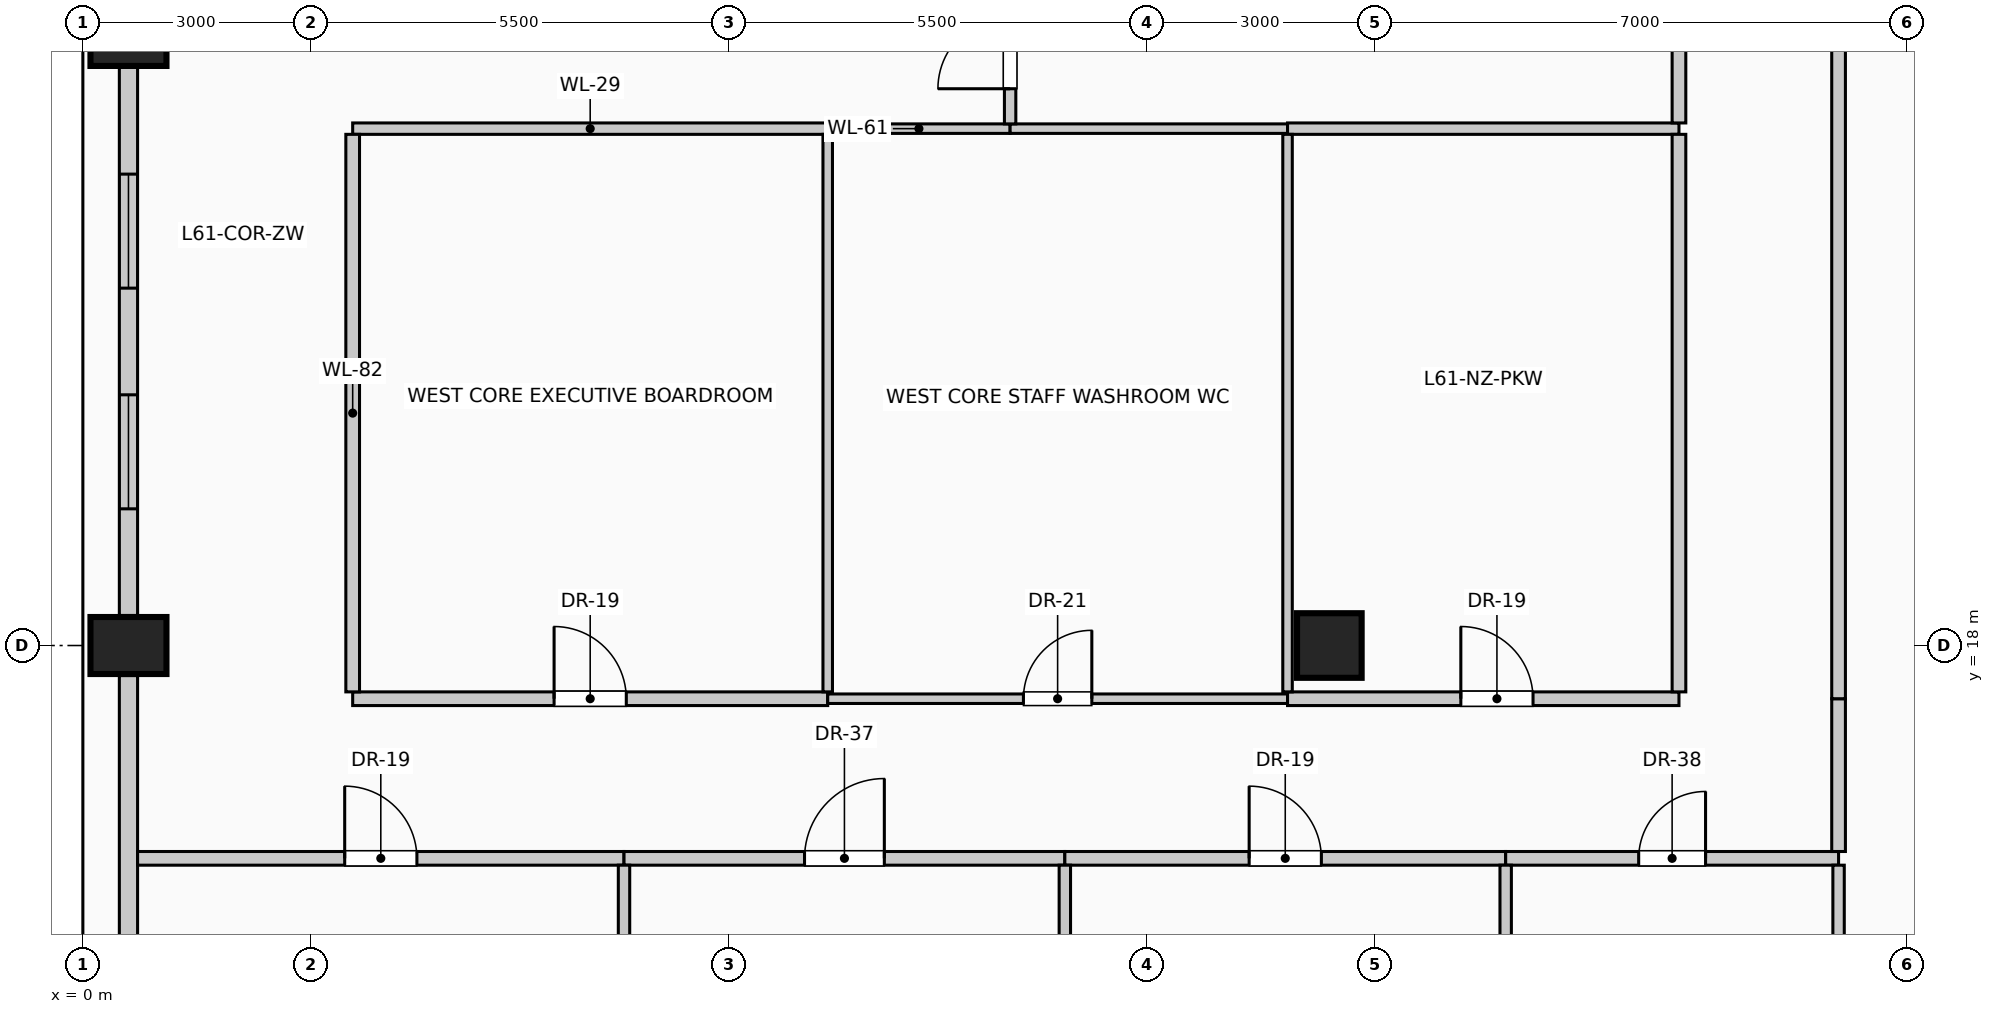
"""IFC4 building model, lengths in metres.
Left out: names, types, materials, properties, quantities, classifications, styles, units other than length and angle.
Written with IfcOpenShell. Run it as: python <this file> out.ifc"""

import sys

from ifc_helpers import new_model, si_unit, direction, frame, frame_2d, origin, origin_2d, place, context, subcontext, project, spatial, rectangle, circle, extrude, element, fill, save


model = new_model("IFC4")
c1 = context("Model", 3, precision=1e-05, world=origin(), true_north=direction((0.0, 1.0)))
c2 = subcontext(c1, "Body", "Model", "MODEL_VIEW")
j1 = project(units=[si_unit("LENGTHUNIT", "METRE"), si_unit("PLANEANGLEUNIT", "RADIAN")], contexts=[c1])
p1 = place(None, origin())
s1 = spatial("IfcSite", under=j1, at=p1, CompositionType="ELEMENT")
p2 = place(p1, origin())
s2 = spatial("IfcBuilding", under=s1, at=p2, CompositionType="ELEMENT")
p3 = place(p2, frame((0.0, 0.0, 252.6)))
s3 = spatial("IfcBuildingStorey", under=s2, at=p3, CompositionType="ELEMENT", Elevation=252.6)
for number, where, z_axis, x_axis in (
    (1, (0.6, 18.0, 0.0), (0.0, 0.0, 1.0), (0.0, 1.0, 0.0)),
    (2, (0.6, 26.0, 0.0), (0.0, 0.0, 1.0), (0.0, 1.0, 0.0)),
):
    element("IfcColumn", number, at=place(p3, frame(where, z_axis=z_axis, x_axis=x_axis)), inside=s3, PredefinedType="COLUMN", context=c2, shape_type="SweptSolid", body=[
        extrude(rectangle(XDim=0.75, YDim=1.0, at=origin_2d()), origin(), (0.0, 0.0, 1.0), 4.0),
    ])
p4 = place(p3, frame((16.4, 18.0, 0.0), z_axis=(0.0, 0.0, 1.0), x_axis=(1.0, 0.0, 0.0)))
e3 = element("IfcColumn", 3, at=p4, inside=s3, PredefinedType="COLUMN", context=c2, shape_type="SweptSolid", body=[
    extrude(circle(Radius=0.425, at=origin_2d()), origin(), (0.0, 0.0, 1.0), 4.0),
])
p5 = place(p3, frame((0.6, 10.395, 0.0), z_axis=(0.0, 0.0, 1.0), x_axis=(0.0, 1.0, 0.0)))
e4 = element("IfcWall", 4, at=p5, inside=s3, PredefinedType="SOLIDWALL", context=c2, shape_type="SweptSolid", body=[
    extrude(rectangle(XDim=7.21, YDim=0.24, at=frame_2d((3.605, 0.0))), origin(), (0.0, 0.0, 1.0), 3.0),
])
p6 = place(p5, frame((1.403, 0.0, 0.42)))
e5 = element("IfcOpeningElement", 5, at=p6, cuts=e4, PredefinedType="OPENING", context=c2, shape_type="SweptSolid", body=[
    extrude(rectangle(XDim=1.5, YDim=2.2, at=frame_2d((0.75, 1.1))), frame((0.0, 0.13, 0.0), z_axis=(0.0, -1.0, 0.0), x_axis=(1.0, 0.0, 0.0)), (0.0, 0.0, 1.0), 0.26),
])
p7 = place(p3, frame((0.6, 18.395, 0.0), z_axis=(0.0, 0.0, 1.0), x_axis=(0.0, 1.0, 0.0)))
e6 = element("IfcWall", 6, at=p7, inside=s3, PredefinedType="SOLIDWALL", context=c2, shape_type="SweptSolid", body=[
    extrude(rectangle(XDim=7.21, YDim=0.24, at=frame_2d((3.605, 0.0))), origin(), (0.0, 0.0, 1.0), 3.0),
])
p8 = place(p7, frame((1.403, 0.0, 0.42)))
e7 = element("IfcOpeningElement", 7, at=p8, cuts=e6, PredefinedType="OPENING", context=c2, shape_type="SweptSolid", body=[
    extrude(rectangle(XDim=1.5, YDim=2.2, at=frame_2d((0.75, 1.1))), frame((0.0, 0.13, 0.0), z_axis=(0.0, -1.0, 0.0), x_axis=(1.0, 0.0, 0.0)), (0.0, 0.0, 1.0), 0.26),
])
p9 = place(p7, frame((4.307, 0.0, 0.42)))
e8 = element("IfcOpeningElement", 8, at=p9, cuts=e6, PredefinedType="OPENING", context=c2, shape_type="SweptSolid", body=[
    extrude(rectangle(XDim=1.5, YDim=2.2, at=frame_2d((0.75, 1.1))), frame((0.0, 0.13, 0.0), z_axis=(0.0, -1.0, 0.0), x_axis=(1.0, 0.0, 0.0)), (0.0, 0.0, 1.0), 0.26),
])
p10 = place(p3, frame((0.72, 15.2, 0.0), z_axis=(0.0, 0.0, 1.0), x_axis=(1.0, 0.0, 0.0)))
e9 = element("IfcWall", 9, at=p10, inside=s3, PredefinedType="PARTITIONING", context=c2, shape_type="SweptSolid", body=[
    extrude(rectangle(XDim=6.4, YDim=0.18, at=frame_2d((3.2, 0.0))), origin(), (0.0, 0.0, 1.0), 3.75),
])
p11 = place(p10, frame((2.725, 0.0, 0.0)))
e10 = element("IfcOpeningElement", 10, at=p11, cuts=e9, PredefinedType="OPENING", context=c2, shape_type="SweptSolid", body=[
    extrude(rectangle(XDim=0.95, YDim=2.15, at=frame_2d((0.475, 1.075))), frame((0.0, 0.1, 0.0), z_axis=(0.0, -1.0, 0.0), x_axis=(1.0, 0.0, 0.0)), (0.0, 0.0, 1.0), 0.2),
])
p12 = place(p3, frame((7.12, 15.2, 0.0), z_axis=(0.0, 0.0, 1.0), x_axis=(1.0, 0.0, 0.0)))
e11 = element("IfcWall", 11, at=p12, inside=s3, PredefinedType="PARTITIONING", context=c2, shape_type="SweptSolid", body=[
    extrude(rectangle(XDim=5.8, YDim=0.18, at=frame_2d((2.9, 0.0))), origin(), (0.0, 0.0, 1.0), 3.75),
])
p13 = place(p12, frame((2.375, 0.0, 0.0)))
e12 = element("IfcOpeningElement", 12, at=p13, cuts=e11, PredefinedType="OPENING", context=c2, shape_type="SweptSolid", body=[
    extrude(rectangle(XDim=1.05, YDim=2.15, at=frame_2d((0.525, 1.075))), frame((0.0, 0.1, 0.0), z_axis=(0.0, -1.0, 0.0), x_axis=(1.0, 0.0, 0.0)), (0.0, 0.0, 1.0), 0.2),
])
p14 = place(p3, frame((12.92, 15.2, 0.0), z_axis=(0.0, 0.0, 1.0), x_axis=(1.0, 0.0, 0.0)))
e13 = element("IfcWall", 13, at=p14, inside=s3, PredefinedType="PARTITIONING", context=c2, shape_type="SweptSolid", body=[
    extrude(rectangle(XDim=5.8, YDim=0.18, at=frame_2d((2.9, 0.0))), origin(), (0.0, 0.0, 1.0), 3.75),
])
p15 = place(p14, frame((2.425, 0.0, 0.0)))
e14 = element("IfcOpeningElement", 14, at=p15, cuts=e13, PredefinedType="OPENING", context=c2, shape_type="SweptSolid", body=[
    extrude(rectangle(XDim=0.95, YDim=2.15, at=frame_2d((0.475, 1.075))), frame((0.0, 0.1, 0.0), z_axis=(0.0, -1.0, 0.0), x_axis=(1.0, 0.0, 0.0)), (0.0, 0.0, 1.0), 0.2),
])
p16 = place(p3, frame((18.72, 15.2, 0.0), z_axis=(0.0, 0.0, 1.0), x_axis=(1.0, 0.0, 0.0)))
e15 = element("IfcWall", 15, at=p16, inside=s3, PredefinedType="PARTITIONING", context=c2, shape_type="SweptSolid", body=[
    extrude(rectangle(XDim=4.38, YDim=0.18, at=frame_2d((2.19, 0.0))), origin(), (0.0, 0.0, 1.0), 3.75),
])
p17 = place(p16, frame((1.75, 0.0, 0.0)))
e16 = element("IfcOpeningElement", 16, at=p17, cuts=e15, PredefinedType="OPENING", context=c2, shape_type="SweptSolid", body=[
    extrude(rectangle(XDim=0.88, YDim=2.1, at=frame_2d((0.44, 1.05))), frame((0.0, 0.1, 0.0), z_axis=(0.0, -1.0, 0.0), x_axis=(1.0, 0.0, 0.0)), (0.0, 0.0, 1.0), 0.2),
])
p18 = place(p3, frame((3.55, 17.3, 0.0), z_axis=(0.0, 0.0, 1.0), x_axis=(1.0, 0.0, 0.0)))
e17 = element("IfcWall", 17, at=p18, inside=s3, PredefinedType="PARTITIONING", context=c2, shape_type="SweptSolid", body=[
    extrude(rectangle(XDim=6.25, YDim=0.18, at=frame_2d((3.125, 0.0))), origin(), (0.0, 0.0, 1.0), 3.75),
])
p19 = place(p18, frame((2.65, 0.0, 0.0)))
e18 = element("IfcOpeningElement", 18, at=p19, cuts=e17, PredefinedType="OPENING", context=c2, shape_type="SweptSolid", body=[
    extrude(rectangle(XDim=0.95, YDim=2.15, at=frame_2d((0.475, 1.075))), frame((0.0, 0.1, 0.0), z_axis=(0.0, -1.0, 0.0), x_axis=(1.0, 0.0, 0.0)), (0.0, 0.0, 1.0), 0.2),
])
p20 = place(p3, frame((9.8, 17.3, 0.0), z_axis=(0.0, 0.0, 1.0), x_axis=(1.0, 0.0, 0.0)))
e19 = element("IfcWall", 19, at=p20, inside=s3, PredefinedType="PARTITIONING", context=c2, shape_type="SweptSolid", body=[
    extrude(rectangle(XDim=6.05, YDim=0.125, at=frame_2d((3.025, 0.0))), origin(), (0.0, 0.0, 1.0), 3.75),
])
p21 = place(p20, frame((2.575, 0.0, 0.0)))
e20 = element("IfcOpeningElement", 20, at=p21, cuts=e19, PredefinedType="OPENING", context=c2, shape_type="SweptSolid", body=[
    extrude(rectangle(XDim=0.9, YDim=2.1, at=frame_2d((0.45, 1.05))), frame((0.0, 0.073, 0.0), z_axis=(0.0, -1.0, 0.0), x_axis=(1.0, 0.0, 0.0)), (0.0, 0.0, 1.0), 0.145),
])
p22 = place(p3, frame((15.85, 17.3, 0.0), z_axis=(0.0, 0.0, 1.0), x_axis=(1.0, 0.0, 0.0)))
e21 = element("IfcWall", 21, at=p22, inside=s3, PredefinedType="PARTITIONING", context=c2, shape_type="SweptSolid", body=[
    extrude(rectangle(XDim=5.15, YDim=0.18, at=frame_2d((2.575, 0.0))), origin(), (0.0, 0.0, 1.0), 3.75),
])
p23 = place(p22, frame((2.28, 0.0, 0.0)))
e22 = element("IfcOpeningElement", 22, at=p23, cuts=e21, PredefinedType="OPENING", context=c2, shape_type="SweptSolid", body=[
    extrude(rectangle(XDim=0.95, YDim=2.15, at=frame_2d((0.475, 1.075))), frame((0.0, 0.1, 0.0), z_axis=(0.0, -1.0, 0.0), x_axis=(1.0, 0.0, 0.0)), (0.0, 0.0, 1.0), 0.2),
])
p24 = place(p3, frame((3.55, 24.8, 0.0), z_axis=(0.0, 0.0, 1.0), x_axis=(1.0, 0.0, 0.0)))
e23 = element("IfcWall", 23, at=p24, inside=s3, PredefinedType="PARTITIONING", context=c2, shape_type="SweptSolid", body=[
    extrude(rectangle(XDim=6.25, YDim=0.15, at=frame_2d((3.125, 0.0))), origin(), (0.0, 0.0, 1.0), 3.75),
])
p25 = place(p3, frame((9.8, 24.8, 0.0), z_axis=(0.0, 0.0, 1.0), x_axis=(1.0, 0.0, 0.0)))
e24 = element("IfcWall", 24, at=p25, inside=s3, PredefinedType="PARTITIONING", context=c2, shape_type="SweptSolid", body=[
    extrude(rectangle(XDim=2.4, YDim=0.125, at=frame_2d((1.2, 0.0))), origin(), (0.0, 0.0, 1.0), 3.75),
])
p26 = place(p3, frame((12.2, 24.8, 0.0), z_axis=(0.0, 0.0, 1.0), x_axis=(1.0, 0.0, 0.0)))
e25 = element("IfcWall", 25, at=p26, inside=s3, PredefinedType="PARTITIONING", context=c2, shape_type="SweptSolid", body=[
    extrude(rectangle(XDim=3.65, YDim=0.125, at=frame_2d((1.825, 0.0))), origin(), (0.0, 0.0, 1.0), 3.75),
])
p27 = place(p3, frame((15.85, 24.8, 0.0), z_axis=(0.0, 0.0, 1.0), x_axis=(1.0, 0.0, 0.0)))
e26 = element("IfcWall", 26, at=p27, inside=s3, PredefinedType="PARTITIONING", context=c2, shape_type="SweptSolid", body=[
    extrude(rectangle(XDim=5.15, YDim=0.15, at=frame_2d((2.575, 0.0))), origin(), (0.0, 0.0, 1.0), 3.75),
])
p28 = place(p3, frame((3.55, 17.39, 0.0), z_axis=(0.0, 0.0, 1.0), x_axis=(0.0, 1.0, 0.0)))
e27 = element("IfcWall", 27, at=p28, inside=s3, PredefinedType="PARTITIONING", context=c2, shape_type="SweptSolid", body=[
    extrude(rectangle(XDim=7.335, YDim=0.18, at=frame_2d((3.667, 0.0))), origin(), (0.0, 0.0, 1.0), 3.75),
])
p29 = place(p3, frame((7.12, 0.72, 0.0), z_axis=(0.0, 0.0, 1.0), x_axis=(0.0, 1.0, 0.0)))
e28 = element("IfcWall", 28, at=p29, inside=s3, PredefinedType="PARTITIONING", context=c2, shape_type="SweptSolid", body=[
    extrude(rectangle(XDim=14.39, YDim=0.15, at=frame_2d((7.195, 0.0))), origin(), (0.0, 0.0, 1.0), 3.75),
])
p30 = place(p3, frame((9.8, 17.39, 0.0), z_axis=(0.0, 0.0, 1.0), x_axis=(0.0, 1.0, 0.0)))
e29 = element("IfcWall", 29, at=p30, inside=s3, PredefinedType="PARTITIONING", context=c2, shape_type="SweptSolid", body=[
    extrude(rectangle(XDim=7.335, YDim=0.125, at=frame_2d((3.667, 0.0))), origin(), (0.0, 0.0, 1.0), 3.75),
])
p31 = place(p3, frame((12.2, 24.863, 0.0), z_axis=(0.0, 0.0, 1.0), x_axis=(0.0, 1.0, 0.0)))
e30 = element("IfcWall", 30, at=p31, inside=s3, PredefinedType="PARTITIONING", context=c2, shape_type="SweptSolid", body=[
    extrude(rectangle(XDim=1.875, YDim=0.15, at=frame_2d((0.938, 0.0))), origin(), (0.0, 0.0, 1.0), 3.75),
])
p32 = place(p31, frame((0.462, 0.0, 0.0)))
e31 = element("IfcOpeningElement", 31, at=p32, cuts=e30, PredefinedType="OPENING", context=c2, shape_type="SweptSolid", body=[
    extrude(rectangle(XDim=0.95, YDim=2.15, at=frame_2d((0.475, 1.075))), frame((0.0, 0.085, 0.0), z_axis=(0.0, -1.0, 0.0), x_axis=(1.0, 0.0, 0.0)), (0.0, 0.0, 1.0), 0.17),
])
p33 = place(p3, frame((12.92, 0.72, 0.0), z_axis=(0.0, 0.0, 1.0), x_axis=(0.0, 1.0, 0.0)))
e32 = element("IfcWall", 32, at=p33, inside=s3, PredefinedType="PARTITIONING", context=c2, shape_type="SweptSolid", body=[
    extrude(rectangle(XDim=14.39, YDim=0.15, at=frame_2d((7.195, 0.0))), origin(), (0.0, 0.0, 1.0), 3.75),
])
p34 = place(p3, frame((15.85, 17.39, 0.0), z_axis=(0.0, 0.0, 1.0), x_axis=(0.0, 1.0, 0.0)))
e33 = element("IfcWall", 33, at=p34, inside=s3, PredefinedType="PARTITIONING", context=c2, shape_type="SweptSolid", body=[
    extrude(rectangle(XDim=7.335, YDim=0.125, at=frame_2d((3.667, 0.0))), origin(), (0.0, 0.0, 1.0), 3.75),
])
p35 = place(p3, frame((18.72, 0.72, 0.0), z_axis=(0.0, 0.0, 1.0), x_axis=(0.0, 1.0, 0.0)))
e34 = element("IfcWall", 34, at=p35, inside=s3, PredefinedType="PARTITIONING", context=c2, shape_type="SweptSolid", body=[
    extrude(rectangle(XDim=14.39, YDim=0.15, at=frame_2d((7.195, 0.0))), origin(), (0.0, 0.0, 1.0), 3.75),
])
p36 = place(p3, frame((21.0, 17.39, 0.0), z_axis=(0.0, 0.0, 1.0), x_axis=(0.0, 1.0, 0.0)))
e35 = element("IfcWall", 35, at=p36, inside=s3, PredefinedType="PARTITIONING", context=c2, shape_type="SweptSolid", body=[
    extrude(rectangle(XDim=7.335, YDim=0.18, at=frame_2d((3.667, 0.0))), origin(), (0.0, 0.0, 1.0), 3.75),
])
p37 = place(p3, frame((21.0, 24.875, 0.0), z_axis=(0.0, 0.0, 1.0), x_axis=(0.0, 1.0, 0.0)))
e36 = element("IfcWall", 36, at=p37, inside=s3, PredefinedType="PARTITIONING", context=c2, shape_type="SweptSolid", body=[
    extrude(rectangle(XDim=2.35, YDim=0.18, at=frame_2d((1.175, 0.0))), origin(), (0.0, 0.0, 1.0), 3.75),
])
p38 = place(p3, frame((23.1, 0.72, 0.0), z_axis=(0.0, 0.0, 1.0), x_axis=(0.0, 1.0, 0.0)))
e37 = element("IfcWall", 37, at=p38, inside=s3, PredefinedType="PARTITIONING", context=c2, shape_type="SweptSolid", body=[
    extrude(rectangle(XDim=14.39, YDim=0.15, at=frame_2d((7.195, 0.0))), origin(), (0.0, 0.0, 1.0), 3.75),
])
p39 = place(p3, frame((23.1, 15.29, 0.0), z_axis=(0.0, 0.0, 1.0), x_axis=(0.0, 1.0, 0.0)))
e38 = element("IfcWall", 38, at=p39, inside=s3, PredefinedType="PARTITIONING", context=c2, shape_type="SweptSolid", body=[
    extrude(rectangle(XDim=2.01, YDim=0.18, at=frame_2d((1.005, 0.0))), origin(), (0.0, 0.0, 1.0), 3.75),
])
p40 = place(p3, frame((23.1, 17.3, 0.0), z_axis=(0.0, 0.0, 1.0), x_axis=(0.0, 1.0, 0.0)))
e39 = element("IfcWall", 39, at=p40, inside=s3, PredefinedType="PARTITIONING", context=c2, shape_type="SweptSolid", body=[
    extrude(rectangle(XDim=9.51, YDim=0.18, at=frame_2d((4.755, 0.0))), origin(), (0.0, 0.0, 1.0), 3.75),
])
p41 = place(p8, origin())
e40 = element("IfcWindow", 40, at=p41, inside=s3, PartitioningType="SINGLE_PANEL", PredefinedType="WINDOW", context=c2, shape_type="SweptSolid", body=[
    extrude(rectangle(XDim=1.5, YDim=2.2, at=frame_2d((0.75, 1.1))), frame((0.0, 0.03, 0.0), z_axis=(0.0, -1.0, 0.0), x_axis=(1.0, 0.0, 0.0)), (0.0, 0.0, 1.0), 0.06),
])
fill(e7, e40)
p42 = place(p9, origin())
e41 = element("IfcWindow", 41, at=p42, inside=s3, PartitioningType="SINGLE_PANEL", PredefinedType="WINDOW", context=c2, shape_type="SweptSolid", body=[
    extrude(rectangle(XDim=1.5, YDim=2.2, at=frame_2d((0.75, 1.1))), frame((0.0, 0.03, 0.0), z_axis=(0.0, -1.0, 0.0), x_axis=(1.0, 0.0, 0.0)), (0.0, 0.0, 1.0), 0.06),
])
fill(e8, e41)
p43 = place(p11, origin())
e42 = element("IfcDoor", 42, at=p43, inside=s3, OperationType="SINGLE_SWING_LEFT", PredefinedType="DOOR", context=c2, shape_type="SweptSolid", body=[
    extrude(rectangle(XDim=0.95, YDim=2.15, at=frame_2d((0.475, 1.075))), frame((0.0, 0.025, 0.0), z_axis=(0.0, -1.0, 0.0), x_axis=(1.0, 0.0, 0.0)), (0.0, 0.0, 1.0), 0.05),
])
fill(e10, e42)
p44 = place(p13, origin())
e43 = element("IfcDoor", 43, at=p44, inside=s3, OperationType="SINGLE_SWING_RIGHT", PredefinedType="DOOR", context=c2, shape_type="SweptSolid", body=[
    extrude(rectangle(XDim=1.05, YDim=2.15, at=frame_2d((0.525, 1.075))), frame((0.0, 0.025, 0.0), z_axis=(0.0, -1.0, 0.0), x_axis=(1.0, 0.0, 0.0)), (0.0, 0.0, 1.0), 0.05),
])
fill(e12, e43)
p45 = place(p15, origin())
e44 = element("IfcDoor", 44, at=p45, inside=s3, OperationType="SINGLE_SWING_LEFT", PredefinedType="DOOR", context=c2, shape_type="SweptSolid", body=[
    extrude(rectangle(XDim=0.95, YDim=2.15, at=frame_2d((0.475, 1.075))), frame((0.0, 0.025, 0.0), z_axis=(0.0, -1.0, 0.0), x_axis=(1.0, 0.0, 0.0)), (0.0, 0.0, 1.0), 0.05),
])
fill(e14, e44)
p46 = place(p17, origin())
e45 = element("IfcDoor", 45, at=p46, inside=s3, OperationType="SINGLE_SWING_RIGHT", PredefinedType="DOOR", context=c2, shape_type="SweptSolid", body=[
    extrude(rectangle(XDim=0.88, YDim=2.1, at=frame_2d((0.44, 1.05))), frame((0.0, 0.025, 0.0), z_axis=(0.0, -1.0, 0.0), x_axis=(1.0, 0.0, 0.0)), (0.0, 0.0, 1.0), 0.05),
])
fill(e16, e45)
p47 = place(p19, origin())
e46 = element("IfcDoor", 46, at=p47, inside=s3, OperationType="SINGLE_SWING_LEFT", PredefinedType="DOOR", context=c2, shape_type="SweptSolid", body=[
    extrude(rectangle(XDim=0.95, YDim=2.15, at=frame_2d((0.475, 1.075))), frame((0.0, 0.025, 0.0), z_axis=(0.0, -1.0, 0.0), x_axis=(1.0, 0.0, 0.0)), (0.0, 0.0, 1.0), 0.05),
])
fill(e18, e46)
p48 = place(p21, origin())
e47 = element("IfcDoor", 47, at=p48, inside=s3, OperationType="SINGLE_SWING_RIGHT", PredefinedType="DOOR", context=c2, shape_type="SweptSolid", body=[
    extrude(rectangle(XDim=0.9, YDim=2.1, at=frame_2d((0.45, 1.05))), frame((0.0, 0.025, 0.0), z_axis=(0.0, -1.0, 0.0), x_axis=(1.0, 0.0, 0.0)), (0.0, 0.0, 1.0), 0.05),
])
fill(e20, e47)
p49 = place(p23, origin())
e48 = element("IfcDoor", 48, at=p49, inside=s3, OperationType="SINGLE_SWING_LEFT", PredefinedType="DOOR", context=c2, shape_type="SweptSolid", body=[
    extrude(rectangle(XDim=0.95, YDim=2.15, at=frame_2d((0.475, 1.075))), frame((0.0, 0.025, 0.0), z_axis=(0.0, -1.0, 0.0), x_axis=(1.0, 0.0, 0.0)), (0.0, 0.0, 1.0), 0.05),
])
fill(e22, e48)
p50 = place(p32, origin())
e49 = element("IfcDoor", 49, at=p50, inside=s3, OperationType="SINGLE_SWING_LEFT", PredefinedType="DOOR", context=c2, shape_type="SweptSolid", body=[
    extrude(rectangle(XDim=0.95, YDim=2.15, at=frame_2d((0.475, 1.075))), frame((0.0, 0.025, 0.0), z_axis=(0.0, -1.0, 0.0), x_axis=(1.0, 0.0, 0.0)), (0.0, 0.0, 1.0), 0.05),
])
fill(e31, e49)
save(model, sys.argv[1])
